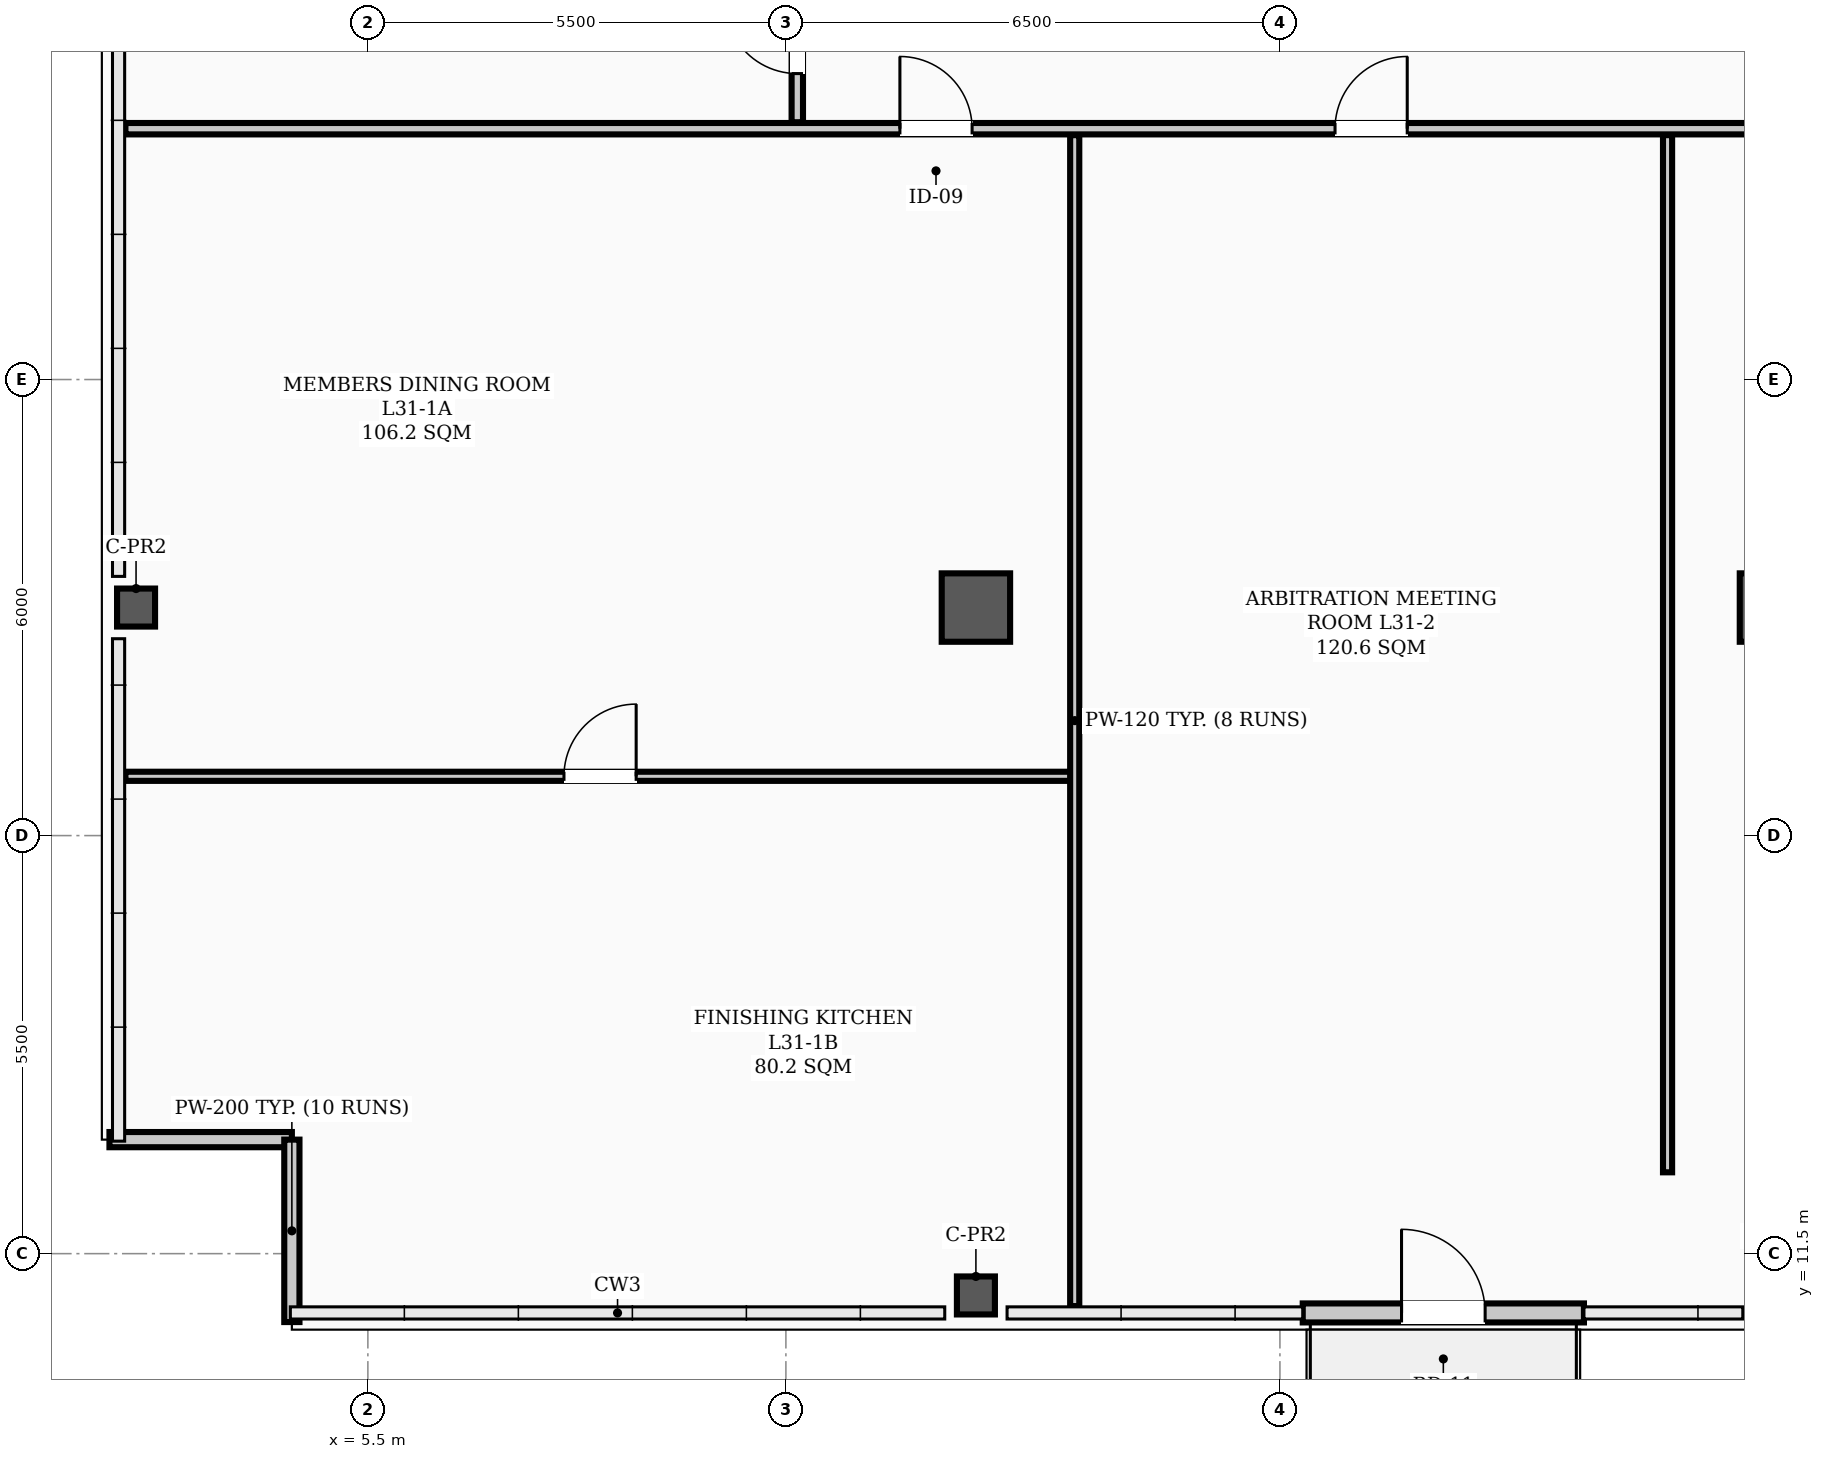
"""IFC4 building model, lengths in metres.
Left out: names, types, materials, properties, quantities, classifications, styles, units other than length and angle.
Written with IfcOpenShell. Run it as: python <this file> out.ifc"""

import sys

from ifc_helpers import new_model, si_unit, direction, frame, frame_2d, origin, origin_2d, place, context, subcontext, project, spatial, rectangle, hollow_rectangle, extrude, element, fill, save


model = new_model("IFC4")
c1 = context("Model", 3, precision=1e-05, world=origin(), true_north=direction((0.0, 1.0)))
c2 = subcontext(c1, "Body", "Model", "MODEL_VIEW")
j1 = project(units=[si_unit("LENGTHUNIT", "METRE"), si_unit("PLANEANGLEUNIT", "RADIAN")], contexts=[c1])
p1 = place(None, origin())
s1 = spatial("IfcSite", under=j1, at=p1, CompositionType="ELEMENT")
p2 = place(p1, origin())
s2 = spatial("IfcBuilding", under=s1, at=p2, CompositionType="ELEMENT")
p3 = place(p2, frame((0.0, 0.0, 126.6)))
s3 = spatial("IfcBuildingStorey", under=s2, at=p3, CompositionType="ELEMENT", Elevation=126.6)
for number, where, z_axis, x_axis in (
    (1, (13.5, 20.0, 0.0), (0.0, 0.0, 1.0), (1.0, 0.0, 0.0)),
    (2, (24.0, 20.0, 0.0), (0.0, 0.0, 1.0), (1.0, 0.0, 0.0)),
):
    element("IfcColumn", number, at=place(p3, frame(where, z_axis=z_axis, x_axis=x_axis)), inside=s3, PredefinedType="COLUMN", context=c2, shape_type="SweptSolid", body=[
        extrude(hollow_rectangle(XDim=0.9, YDim=0.9, WallThickness=0.035, InnerFilletRadius=0.017, OuterFilletRadius=0.052, at=origin_2d()), origin(), (0.0, 0.0, 1.0), 3.9),
    ])
for number, where, z_axis, x_axis in (
    (3, (2.45, 20.0, 0.0), (0.0, 0.0, 1.0), (1.0, 0.0, 0.0)),
    (4, (13.5, 10.95, 0.0), (0.0, 0.0, 1.0), (1.0, 0.0, 0.0)),
):
    element("IfcColumn", number, at=place(p3, frame(where, z_axis=z_axis, x_axis=x_axis)), inside=s3, PredefinedType="COLUMN", context=c2, shape_type="SweptSolid", body=[
        extrude(hollow_rectangle(XDim=0.5, YDim=0.5, WallThickness=0.024, InnerFilletRadius=0.012, OuterFilletRadius=0.036, at=origin_2d()), origin(), (0.0, 0.0, 1.0), 3.9),
    ])
for number, where, z_axis, x_axis in (
    (5, (2.1, 13.0, 0.0), (0.0, 0.0, 1.0), (1.0, 0.0, 0.0)),
    (6, (4.5, 13.0, 0.0), (0.0, 0.0, 1.0), (0.0, -1.0, 0.0)),
):
    element("IfcWall", number, at=place(p3, frame(where, z_axis=z_axis, x_axis=x_axis)), inside=s3, PredefinedType="PARAPET", context=c2, shape_type="SweptSolid", body=[
        extrude(rectangle(XDim=2.4, YDim=0.2, at=frame_2d((1.2, 0.0))), origin(), (0.0, 0.0, 1.0), 1.2),
    ])
p4 = place(p3, frame((17.8, 10.72, 0.0), z_axis=(0.0, 0.0, 1.0), x_axis=(1.0, 0.0, 0.0)))
e7 = element("IfcWall", 7, at=p4, inside=s3, PredefinedType="STANDARD", context=c2, shape_type="SweptSolid", body=[
    extrude(rectangle(XDim=3.7, YDim=0.25, at=frame_2d((1.85, 0.0))), origin(), (0.0, 0.0, 1.0), 3.18),
])
p5 = place(p4, frame((1.3, 0.0, 0.0)))
e8 = element("IfcOpeningElement", 8, at=p5, cuts=e7, PredefinedType="OPENING", context=c2, shape_type="SweptSolid", body=[
    extrude(rectangle(XDim=1.1, YDim=2.2, at=frame_2d((0.55, 1.1))), frame((0.0, 0.135, 0.0), z_axis=(0.0, -1.0, 0.0), x_axis=(1.0, 0.0, 0.0)), (0.0, 0.0, 1.0), 0.27),
])
p6 = place(p3, frame((2.31, 26.3, 0.0), z_axis=(0.0, 0.0, 1.0), x_axis=(1.0, 0.0, 0.0)))
e9 = element("IfcWall", 9, at=p6, inside=s3, PredefinedType="PARTITIONING", context=c2, shape_type="SweptSolid", body=[
    extrude(rectangle(XDim=46.38, YDim=0.15, at=frame_2d((23.19, 0.0))), origin(), (0.0, 0.0, 1.0), 3.1),
])
p7 = place(p6, frame((10.19, 0.0, 0.0)))
e10 = element("IfcOpeningElement", 10, at=p7, cuts=e9, PredefinedType="OPENING", context=c2, shape_type="SweptSolid", body=[
    extrude(rectangle(XDim=0.95, YDim=2.08, at=frame_2d((0.475, 1.04))), frame((0.0, 0.085, 0.0), z_axis=(0.0, -1.0, 0.0), x_axis=(1.0, 0.0, 0.0)), (0.0, 0.0, 1.0), 0.17),
])
p8 = place(p6, frame((15.915, 0.0, 0.0)))
e11 = element("IfcOpeningElement", 11, at=p8, cuts=e9, PredefinedType="OPENING", context=c2, shape_type="SweptSolid", body=[
    extrude(rectangle(XDim=0.95, YDim=2.08, at=frame_2d((0.475, 1.04))), frame((0.0, 0.085, 0.0), z_axis=(0.0, -1.0, 0.0), x_axis=(1.0, 0.0, 0.0)), (0.0, 0.0, 1.0), 0.17),
])
p9 = place(p6, frame((24.115, 0.0, 0.0)))
e12 = element("IfcOpeningElement", 12, at=p9, cuts=e9, PredefinedType="OPENING", context=c2, shape_type="SweptSolid", body=[
    extrude(rectangle(XDim=0.95, YDim=2.08, at=frame_2d((0.475, 1.04))), frame((0.0, 0.085, 0.0), z_axis=(0.0, -1.0, 0.0), x_axis=(1.0, 0.0, 0.0)), (0.0, 0.0, 1.0), 0.17),
])
p10 = place(p6, frame((32.515, 0.0, 0.0)))
e13 = element("IfcOpeningElement", 13, at=p10, cuts=e9, PredefinedType="OPENING", context=c2, shape_type="SweptSolid", body=[
    extrude(rectangle(XDim=0.95, YDim=2.08, at=frame_2d((0.475, 1.04))), frame((0.0, 0.085, 0.0), z_axis=(0.0, -1.0, 0.0), x_axis=(1.0, 0.0, 0.0)), (0.0, 0.0, 1.0), 0.17),
])
p11 = place(p6, frame((37.665, 0.0, 0.0)))
e14 = element("IfcOpeningElement", 14, at=p11, cuts=e9, PredefinedType="OPENING", context=c2, shape_type="SweptSolid", body=[
    extrude(rectangle(XDim=0.95, YDim=2.08, at=frame_2d((0.475, 1.04))), frame((0.0, 0.085, 0.0), z_axis=(0.0, -1.0, 0.0), x_axis=(1.0, 0.0, 0.0)), (0.0, 0.0, 1.0), 0.17),
])
p12 = place(p3, frame((2.31, 17.78, 0.0), z_axis=(0.0, 0.0, 1.0), x_axis=(1.0, 0.0, 0.0)))
e15 = element("IfcWall", 15, at=p12, inside=s3, PredefinedType="PARTITIONING", context=c2, shape_type="SweptSolid", body=[
    extrude(rectangle(XDim=12.49, YDim=0.12, at=frame_2d((6.245, 0.0))), origin(), (0.0, 0.0, 1.0), 3.1),
])
p13 = place(p12, frame((5.77, 0.0, 0.0)))
e16 = element("IfcOpeningElement", 16, at=p13, cuts=e15, PredefinedType="OPENING", context=c2, shape_type="SweptSolid", body=[
    extrude(rectangle(XDim=0.95, YDim=2.08, at=frame_2d((0.475, 1.04))), frame((0.0, 0.07, 0.0), z_axis=(0.0, -1.0, 0.0), x_axis=(1.0, 0.0, 0.0)), (0.0, 0.0, 1.0), 0.14),
])
p14 = place(p3, frame((11.15, 26.385, 0.0), z_axis=(0.0, 0.0, 1.0), x_axis=(0.0, 1.0, 0.0)))
e17 = element("IfcWall", 17, at=p14, inside=s3, PredefinedType="PARTITIONING", context=c2, shape_type="SweptSolid", body=[
    extrude(rectangle(XDim=11.28, YDim=0.15, at=frame_2d((5.64, 0.0))), origin(), (0.0, 0.0, 1.0), 3.0),
])
p15 = place(p14, frame((0.64, 0.0, 0.0)))
e18 = element("IfcOpeningElement", 18, at=p15, cuts=e17, PredefinedType="OPENING", context=c2, shape_type="SweptSolid", body=[
    extrude(rectangle(XDim=0.95, YDim=2.08, at=frame_2d((0.475, 1.04))), frame((0.0, 0.085, 0.0), z_axis=(0.0, -1.0, 0.0), x_axis=(1.0, 0.0, 0.0)), (0.0, 0.0, 1.0), 0.17),
])
p16 = place(p14, frame((8.615, 0.0, 0.0)))
e19 = element("IfcOpeningElement", 19, at=p16, cuts=e17, PredefinedType="OPENING", context=c2, shape_type="SweptSolid", body=[
    extrude(rectangle(XDim=0.95, YDim=2.08, at=frame_2d((0.475, 1.04))), frame((0.0, 0.085, 0.0), z_axis=(0.0, -1.0, 0.0), x_axis=(1.0, 0.0, 0.0)), (0.0, 0.0, 1.0), 0.17),
])
p17 = place(p3, frame((14.8, 10.81, 0.0), z_axis=(0.0, 0.0, 1.0), x_axis=(0.0, 1.0, 0.0)))
e20 = element("IfcWall", 20, at=p17, inside=s3, PredefinedType="PARTITIONING", context=c2, shape_type="SweptSolid", body=[
    extrude(rectangle(XDim=15.405, YDim=0.12, at=frame_2d((7.703, 0.0))), origin(), (0.0, 0.0, 1.0), 3.0),
])
p18 = place(p3, frame((22.6, 12.57, 0.0), z_axis=(0.0, 0.0, 1.0), x_axis=(0.0, 1.0, 0.0)))
e21 = element("IfcWall", 21, at=p18, inside=s3, PredefinedType="PARTITIONING", context=c2, shape_type="SweptSolid", body=[
    extrude(rectangle(XDim=13.645, YDim=0.12, at=frame_2d((6.823, 0.0))), origin(), (0.0, 0.0, 1.0), 3.0),
])
p19 = place(p5, origin())
e22 = element("IfcDoor", 22, at=p19, inside=s3, OperationType="SINGLE_SWING_LEFT", PredefinedType="DOOR", context=c2, shape_type="SweptSolid", body=[
    extrude(rectangle(XDim=1.1, YDim=2.2, at=frame_2d((0.55, 1.1))), frame((0.0, 0.025, 0.0), z_axis=(0.0, -1.0, 0.0), x_axis=(1.0, 0.0, 0.0)), (0.0, 0.0, 1.0), 0.05),
])
fill(e8, e22)
p20 = place(p13, origin())
e23 = element("IfcDoor", 23, at=p20, inside=s3, OperationType="SINGLE_SWING_RIGHT", PredefinedType="DOOR", context=c2, shape_type="SweptSolid", body=[
    extrude(rectangle(XDim=0.95, YDim=2.08, at=frame_2d((0.475, 1.04))), frame((0.0, 0.025, 0.0), z_axis=(0.0, -1.0, 0.0), x_axis=(1.0, 0.0, 0.0)), (0.0, 0.0, 1.0), 0.05),
])
fill(e16, e23)
p21 = place(p7, origin())
e24 = element("IfcDoor", 24, at=p21, inside=s3, OperationType="SINGLE_SWING_LEFT", PredefinedType="DOOR", context=c2, shape_type="SweptSolid", body=[
    extrude(rectangle(XDim=0.95, YDim=2.08, at=frame_2d((0.475, 1.04))), frame((0.0, 0.025, 0.0), z_axis=(0.0, -1.0, 0.0), x_axis=(1.0, 0.0, 0.0)), (0.0, 0.0, 1.0), 0.05),
])
fill(e10, e24)
p22 = place(p8, origin())
e25 = element("IfcDoor", 25, at=p22, inside=s3, OperationType="SINGLE_SWING_RIGHT", PredefinedType="DOOR", context=c2, shape_type="SweptSolid", body=[
    extrude(rectangle(XDim=0.95, YDim=2.08, at=frame_2d((0.475, 1.04))), frame((0.0, 0.025, 0.0), z_axis=(0.0, -1.0, 0.0), x_axis=(1.0, 0.0, 0.0)), (0.0, 0.0, 1.0), 0.05),
])
fill(e11, e25)
p23 = place(p15, origin())
e26 = element("IfcDoor", 26, at=p23, inside=s3, OperationType="SINGLE_SWING_RIGHT", PredefinedType="DOOR", context=c2, shape_type="SweptSolid", body=[
    extrude(rectangle(XDim=0.95, YDim=2.08, at=frame_2d((0.475, 1.04))), frame((0.0, 0.025, 0.0), z_axis=(0.0, -1.0, 0.0), x_axis=(1.0, 0.0, 0.0)), (0.0, 0.0, 1.0), 0.05),
])
fill(e18, e26)
save(model, sys.argv[1])
